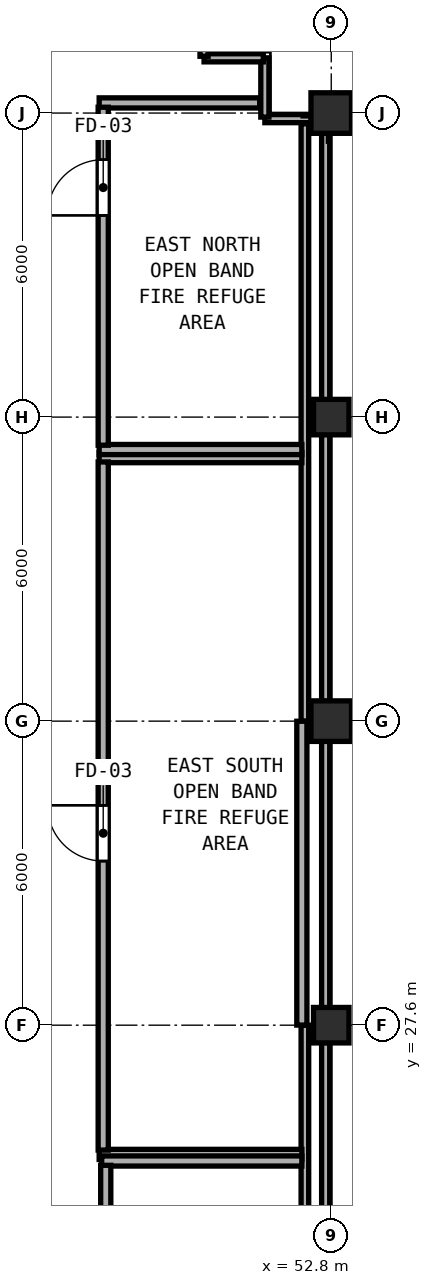
"""IFC4 building model, lengths in metres.
Left out: names, types, materials, properties, quantities, classifications, styles, units other than length and angle.
Written with IfcOpenShell. Run it as: python <this file> out.ifc"""

import sys

from ifc_helpers import new_model, si_unit, direction, frame, frame_2d, origin, origin_2d, place, context, subcontext, project, spatial, rectangle, hollow_rectangle, extrude, element, fill, save


model = new_model("IFC4")
c1 = context("Model", 3, precision=1e-05, world=origin(), true_north=direction((0.0, 1.0)))
c2 = subcontext(c1, "Body", "Model", "MODEL_VIEW")
j1 = project(units=[si_unit("LENGTHUNIT", "METRE"), si_unit("PLANEANGLEUNIT", "RADIAN")], contexts=[c1])
p1 = place(None, origin())
s1 = spatial("IfcSite", under=j1, at=p1, CompositionType="ELEMENT")
p2 = place(p1, origin())
s2 = spatial("IfcBuilding", under=s1, at=p2, CompositionType="ELEMENT")
p3 = place(p2, frame((0.0, 0.0, 277.55)))
s3 = spatial("IfcBuildingStorey", under=s2, at=p3, CompositionType="ELEMENT", Elevation=277.55)
for number, where, z_axis, x_axis in (
    (1, (52.8, 33.6, 0.0), (0.0, 0.0, 1.0), (1.0, 0.0, 0.0)),
    (2, (52.8, 45.6, 0.0), (0.0, 0.0, 1.0), (1.0, 0.0, 0.0)),
):
    element("IfcColumn", number, at=place(p3, frame(where, z_axis=z_axis, x_axis=x_axis)), inside=s3, PredefinedType="COLUMN", context=c2, shape_type="SweptSolid", body=[
        extrude(hollow_rectangle(XDim=0.8, YDim=0.8, WallThickness=0.03, at=origin_2d()), origin(), (0.0, 0.0, 1.0), 4.65),
    ])
for number, where, z_axis, x_axis in (
    (3, (52.8, 27.6, 0.0), (0.0, 0.0, 1.0), (1.0, 0.0, 0.0)),
    (4, (52.8, 39.6, 0.0), (0.0, 0.0, 1.0), (1.0, 0.0, 0.0)),
):
    element("IfcColumn", number, at=place(p3, frame(where, z_axis=z_axis, x_axis=x_axis)), inside=s3, PredefinedType="COLUMN", context=c2, shape_type="SweptSolid", body=[
        extrude(hollow_rectangle(XDim=0.7, YDim=0.7, WallThickness=0.026, at=origin_2d()), origin(), (0.0, 0.0, 1.0), 4.65),
    ])
for number, where, z_axis, x_axis in (
    (5, (52.69, 21.992, 0.0), (0.0, 0.0, 1.0), (0.0, 1.0, 0.0)),
    (6, (52.69, 27.942, 0.0), (0.0, 0.0, 1.0), (0.0, 1.0, 0.0)),
    (7, (52.69, 33.992, 0.0), (0.0, 0.0, 1.0), (0.0, 1.0, 0.0)),
    (8, (52.69, 39.942, 0.0), (0.0, 0.0, 1.0), (0.0, 1.0, 0.0)),
):
    element("IfcWall", number, at=place(p3, frame(where, z_axis=z_axis, x_axis=x_axis)), inside=s3, PredefinedType="PARAPET", context=c2, shape_type="SweptSolid", body=[
        extrude(rectangle(XDim=5.266, YDim=0.16, at=frame_2d((2.633, 0.0))), origin(), (0.0, 0.0, 1.0), 1.15),
    ])
p4 = place(p3, frame((52.408, 45.49, 0.0), z_axis=(0.0, 0.0, 1.0), x_axis=(-1.0, 0.0, 0.0)))
e9 = element("IfcWall", 9, at=p4, inside=s3, PredefinedType="PARAPET", context=c2, shape_type="SweptSolid", body=[
    extrude(rectangle(XDim=0.918, YDim=0.16, at=frame_2d((0.459, 0.0))), origin(), (0.0, 0.0, 1.0), 1.15),
])
for number, where, z_axis, x_axis in (
    (10, (51.49, 45.52, 0.0), (0.0, 0.0, 1.0), (0.0, 1.0, 0.0)),
    (11, (51.46, 46.69, 0.0), (0.0, 0.0, 1.0), (-1.0, 0.0, 0.0)),
):
    element("IfcWall", number, at=place(p3, frame(where, z_axis=z_axis, x_axis=x_axis)), inside=s3, PredefinedType="PARAPET", context=c2, shape_type="SweptSolid", body=[
        extrude(rectangle(XDim=1.17, YDim=0.16, at=frame_2d((0.585, 0.0))), origin(), (0.0, 0.0, 1.0), 1.15),
    ])
p5 = place(p3, frame((50.29, 46.72, 0.0), z_axis=(0.0, 0.0, 1.0), x_axis=(0.0, 1.0, 0.0)))
e12 = element("IfcWall", 12, at=p5, inside=s3, PredefinedType="PARAPET", context=c2, shape_type="SweptSolid", body=[
    extrude(rectangle(XDim=1.225, YDim=0.16, at=frame_2d((0.613, 0.0))), origin(), (0.0, 0.0, 1.0), 1.15),
])
p6 = place(p3, frame((52.28, 21.688, 0.0), z_axis=(0.0, 0.0, 1.0), x_axis=(0.0, 1.0, 0.0)))
e13 = element("IfcWall", 13, at=p6, inside=s3, PredefinedType="PARTITIONING", context=c2, shape_type="SweptSolid", body=[
    extrude(rectangle(XDim=5.912, YDim=0.15, at=frame_2d((2.956, 0.0))), origin(), (0.0, 0.0, 1.0), 4.4),
])
p7 = place(p3, frame((52.28, 33.6, 0.0), z_axis=(0.0, 0.0, 1.0), x_axis=(0.0, 1.0, 0.0)))
e14 = element("IfcWall", 14, at=p7, inside=s3, PredefinedType="PARTITIONING", context=c2, shape_type="SweptSolid", body=[
    extrude(rectangle(XDim=11.788, YDim=0.15, at=frame_2d((5.894, 0.0))), origin(), (0.0, 0.0, 1.0), 4.4),
])
for number, where, z_axis, x_axis in (
    (15, (48.22, 38.8, 0.0), (0.0, 0.0, 1.0), (1.0, 0.0, 0.0)),
    (16, (48.22, 25.05, 0.0), (0.0, 0.0, 1.0), (1.0, 0.0, 0.0)),
):
    element("IfcWall", number, at=place(p3, frame(where, z_axis=z_axis, x_axis=x_axis)), inside=s3, PredefinedType="SOLIDWALL", context=c2, shape_type="SweptSolid", body=[
        extrude(rectangle(XDim=4.0, YDim=0.2, at=frame_2d((2.0, 0.0))), origin(), (0.0, 0.0, 1.0), 4.4),
    ])
p8 = place(p3, frame((48.3, 25.135, 0.0), z_axis=(0.0, 0.0, 1.0), x_axis=(0.0, 1.0, 0.0)))
e17 = element("IfcWall", 17, at=p8, inside=s3, PredefinedType="SOLIDWALL", context=c2, shape_type="SweptSolid", body=[
    extrude(rectangle(XDim=13.58, YDim=0.2, at=frame_2d((6.79, 0.0))), origin(), (0.0, 0.0, 1.0), 4.4),
])
p9 = place(p8, frame((5.704, 0.0, 0.0)))
e18 = element("IfcOpeningElement", 18, at=p9, cuts=e17, PredefinedType="OPENING", context=c2, shape_type="SweptSolid", body=[
    extrude(rectangle(XDim=1.1, YDim=2.15, at=frame_2d((0.55, 1.075))), frame((0.0, 0.11, 0.0), z_axis=(0.0, -1.0, 0.0), x_axis=(1.0, 0.0, 0.0)), (0.0, 0.0, 1.0), 0.22),
])
p10 = place(p3, frame((52.22, 27.602, 0.0), z_axis=(0.0, 0.0, 1.0), x_axis=(0.0, 1.0, 0.0)))
e19 = element("IfcWall", 19, at=p10, inside=s3, PredefinedType="SOLIDWALL", context=c2, shape_type="SweptSolid", body=[
    extrude(rectangle(XDim=5.996, YDim=0.2, at=frame_2d((2.998, 0.0))), origin(), (0.0, 0.0, 1.0), 4.4),
])
p11 = place(p3, frame((48.22, 45.8, 0.0), z_axis=(0.0, 0.0, 1.0), x_axis=(1.0, 0.0, 0.0)))
e20 = element("IfcWall", 20, at=p11, inside=s3, PredefinedType="SOLIDWALL", context=c2, shape_type="SweptSolid", body=[
    extrude(rectangle(XDim=3.168, YDim=0.2, at=frame_2d((1.584, 0.0))), origin(), (0.0, 0.0, 1.0), 4.4),
])
p12 = place(p3, frame((48.22, 38.96, 0.0), z_axis=(0.0, 0.0, 1.0), x_axis=(1.0, 0.0, 0.0)))
e21 = element("IfcWall", 21, at=p12, inside=s3, PredefinedType="SOLIDWALL", context=c2, shape_type="SweptSolid", body=[
    extrude(rectangle(XDim=4.0, YDim=0.2, at=frame_2d((2.0, 0.0))), origin(), (0.0, 0.0, 1.0), 4.4),
])
p13 = place(p3, frame((48.3, 39.045, 0.0), z_axis=(0.0, 0.0, 1.0), x_axis=(0.0, 1.0, 0.0)))
e22 = element("IfcWall", 22, at=p13, inside=s3, PredefinedType="SOLIDWALL", context=c2, shape_type="SweptSolid", body=[
    extrude(rectangle(XDim=6.67, YDim=0.2, at=frame_2d((3.335, 0.0))), origin(), (0.0, 0.0, 1.0), 4.4),
])
p14 = place(p13, frame((4.535, 0.0, 0.0)))
e23 = element("IfcOpeningElement", 23, at=p14, cuts=e22, PredefinedType="OPENING", context=c2, shape_type="SweptSolid", body=[
    extrude(rectangle(XDim=1.1, YDim=2.15, at=frame_2d((0.55, 1.075))), frame((0.0, 0.11, 0.0), z_axis=(0.0, -1.0, 0.0), x_axis=(1.0, 0.0, 0.0)), (0.0, 0.0, 1.0), 0.22),
])
p15 = place(p3, frame((48.27, 24.92, 0.0), z_axis=(0.0, 0.0, 1.0), x_axis=(1.0, 0.0, 0.0)))
e24 = element("IfcWall", 24, at=p15, inside=s3, PredefinedType="SOLIDWALL", context=c2, shape_type="SweptSolid", body=[
    extrude(rectangle(XDim=3.95, YDim=0.2, at=frame_2d((1.975, 0.0))), origin(), (0.0, 0.0, 1.0), 4.4),
])
p16 = place(p3, frame((48.35, 20.706, 0.0), z_axis=(0.0, 0.0, 1.0), x_axis=(0.0, 1.0, 0.0)))
e25 = element("IfcWall", 25, at=p16, inside=s3, PredefinedType="SOLIDWALL", context=c2, shape_type="SweptSolid", body=[
    extrude(rectangle(XDim=4.129, YDim=0.2, at=frame_2d((2.064, 0.0))), origin(), (0.0, 0.0, 1.0), 4.4),
])
p17 = place(p16, frame((0.93, 0.0, 0.0)))
e26 = element("IfcOpeningElement", 26, at=p17, cuts=e25, PredefinedType="OPENING", context=c2, shape_type="SweptSolid", body=[
    extrude(rectangle(XDim=1.0, YDim=2.1, at=frame_2d((0.5, 1.05))), frame((0.0, 0.11, 0.0), z_axis=(0.0, -1.0, 0.0), x_axis=(1.0, 0.0, 0.0)), (0.0, 0.0, 1.0), 0.22),
])
p18 = place(p9, origin())
e27 = element("IfcDoor", 27, at=p18, inside=s3, OperationType="SINGLE_SWING_RIGHT", PredefinedType="DOOR", context=c2, shape_type="SweptSolid", body=[
    extrude(rectangle(XDim=1.1, YDim=2.15, at=frame_2d((0.55, 1.075))), frame((0.0, 0.025, 0.0), z_axis=(0.0, -1.0, 0.0), x_axis=(1.0, 0.0, 0.0)), (0.0, 0.0, 1.0), 0.05),
])
fill(e18, e27)
p19 = place(p14, origin())
e28 = element("IfcDoor", 28, at=p19, inside=s3, OperationType="SINGLE_SWING_LEFT", PredefinedType="DOOR", context=c2, shape_type="SweptSolid", body=[
    extrude(rectangle(XDim=1.1, YDim=2.15, at=frame_2d((0.55, 1.075))), frame((0.0, 0.025, 0.0), z_axis=(0.0, -1.0, 0.0), x_axis=(1.0, 0.0, 0.0)), (0.0, 0.0, 1.0), 0.05),
])
fill(e23, e28)
save(model, sys.argv[1])
